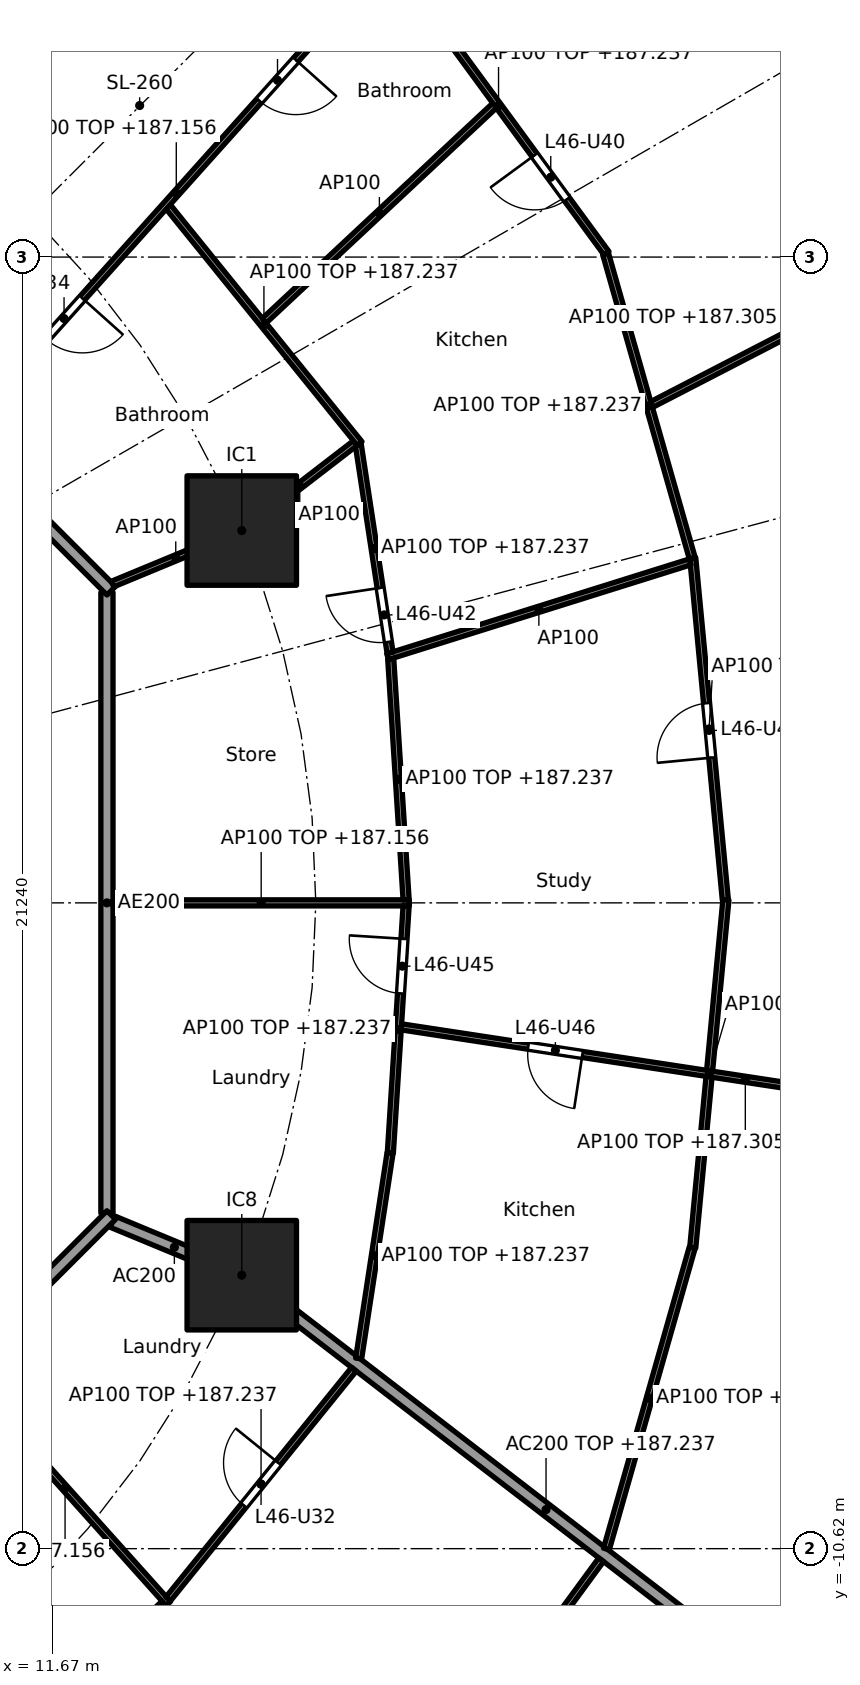
"""IFC4 building model, lengths in metres.
Left out: names, types, materials, properties, quantities, classifications, styles, units other than length and angle.
Written with IfcOpenShell. Run it as: python <this file> out.ifc"""

import sys

from ifc_helpers import new_model, si_unit, direction, frame, frame_2d, origin, origin_2d, place, context, subcontext, project, spatial, rectangle, extrude, element, fill, save


model = new_model("IFC4")
c1 = context("Model", 3, precision=1e-05, world=origin(), true_north=direction((0.0, 1.0)))
c2 = subcontext(c1, "Body", "Model", "MODEL_VIEW")
j1 = project(units=[si_unit("LENGTHUNIT", "METRE"), si_unit("PLANEANGLEUNIT", "RADIAN")], contexts=[c1])
p1 = place(None, origin())
s1 = spatial("IfcSite", under=j1, at=p1, CompositionType="ELEMENT")
p2 = place(p1, origin())
s2 = spatial("IfcBuilding", under=s1, at=p2, CompositionType="ELEMENT")
p3 = place(p2, frame((0.0, 0.0, 184.4)))
s3 = spatial("IfcBuildingStorey", under=s2, at=p3, CompositionType="ELEMENT", Elevation=184.4)
for number, where, z_axis, x_axis in (
    (1, (14.782, 6.123, 0.0), (0.0, 0.0, 1.0), (1.0, 0.0, 0.0)),
    (2, (14.782, -6.123, 0.0), (0.0, 0.0, 1.0), (1.0, 0.0, 0.0)),
):
    element("IfcColumn", number, at=place(p3, frame(where, z_axis=z_axis, x_axis=x_axis)), inside=s3, PredefinedType="COLUMN", context=c2, shape_type="SweptSolid", body=[
        extrude(rectangle(XDim=1.8, YDim=1.8, at=origin_2d()), origin(), (0.0, 0.0, 1.0), 3.7),
    ])
p4 = place(p3, frame((12.657, -5.243, 0.0), z_axis=(0.0, 0.0, 1.0), x_axis=(0.92383017907, -0.382802560388, 0.0)))
e3 = element("IfcWall", 3, at=p4, inside=s3, PredefinedType="PARTITIONING", context=c2, shape_type="SweptSolid", body=[
    extrude(rectangle(XDim=2.2, YDim=0.2, at=frame_2d((1.1, 0.0))), origin(), (0.0, 0.0, 1.0), 3.44),
])
p5 = place(p3, frame((14.822, -6.154, 0.0), z_axis=(0.0, 0.0, 1.0), x_axis=(0.792203056092, -0.610257583254, 0.0)))
e4 = element("IfcWall", 4, at=p5, inside=s3, PredefinedType="PARTITIONING", context=c2, shape_type="SweptSolid", body=[
    extrude(rectangle(XDim=12.533, YDim=0.2, at=frame_2d((6.266, 0.0))), origin(), (0.0, 0.0, 1.0), 2.837),
])
p6 = place(p3, frame((12.565, -5.104, 0.0), z_axis=(0.0, 0.0, 1.0), x_axis=(0.0, 1.0, 0.0)))
e5 = element("IfcWall", 5, at=p6, inside=s3, PredefinedType="PARTITIONING", context=c2, shape_type="SweptSolid", body=[
    extrude(rectangle(XDim=10.209, YDim=0.2, at=frame_2d((5.104, 0.0))), origin(), (0.0, 0.0, 1.0), 3.44),
])
p7 = place(p3, frame((12.635, 5.134, 0.0), z_axis=(0.0, 0.0, 1.0), x_axis=(-0.707106781187, 0.707106781187, 0.0)))
e6 = element("IfcWall", 6, at=p7, inside=s3, PredefinedType="PARTITIONING", context=c2, shape_type="SweptSolid", body=[
    extrude(rectangle(XDim=10.609, YDim=0.2, at=frame_2d((5.305, 0.0))), origin(), (0.0, 0.0, 1.0), 3.44),
])
p8 = place(p7, frame((4.804, 0.0, 0.0)))
e7 = element("IfcOpeningElement", 7, at=p8, cuts=e6, PredefinedType="OPENING", context=c2, shape_type="SweptSolid", body=[
    extrude(rectangle(XDim=1.0, YDim=2.1, at=frame_2d((0.5, 1.05))), frame((0.0, 0.11, 0.0), z_axis=(0.0, -1.0, 0.0), x_axis=(1.0, 0.0, 0.0)), (0.0, 0.0, 1.0), 0.22),
])
p9 = place(p3, frame((5.275, -12.494, 0.0), z_axis=(0.0, 0.0, 1.0), x_axis=(0.707106781187, 0.707106781187, 0.0)))
e8 = element("IfcWall", 8, at=p9, inside=s3, PredefinedType="PARTITIONING", context=c2, shape_type="SweptSolid", body=[
    extrude(rectangle(XDim=10.409, YDim=0.2, at=frame_2d((5.205, 0.0))), origin(), (0.0, 0.0, 1.0), 3.44),
])
p10 = place(p3, frame((12.665, 0.0, 0.0), z_axis=(0.0, 0.0, 1.0), x_axis=(1.0, 0.0, 0.0)))
e9 = element("IfcWall", 9, at=p10, inside=s3, PredefinedType="PARTITIONING", context=c2, shape_type="SweptSolid", body=[
    extrude(rectangle(XDim=4.873, YDim=0.1, at=frame_2d((2.437, 0.0))), origin(), (0.0, 0.0, 1.0), 2.756),
])
p11 = place(p3, frame((17.485, 0.05, 0.0), z_axis=(0.0, 0.0, 1.0), x_axis=(-0.063679314345, 0.99797041285, 0.0)))
e10 = element("IfcWall", 10, at=p11, inside=s3, PredefinedType="PARTITIONING", context=c2, shape_type="SweptSolid", body=[
    extrude(rectangle(XDim=3.972, YDim=0.1, at=frame_2d((1.986, 0.0))), origin(), (0.0, 0.0, 1.0), 2.837),
])
p12 = place(p3, frame((17.485, -0.05, 0.0), z_axis=(0.0, 0.0, 1.0), x_axis=(-0.063673473968, -0.997970785501, 0.0)))
e11 = element("IfcWall", 11, at=p12, inside=s3, PredefinedType="PARTITIONING", context=c2, shape_type="SweptSolid", body=[
    extrude(rectangle(XDim=4.072, YDim=0.1, at=frame_2d((2.036, 0.0))), origin(), (0.0, 0.0, 1.0), 2.837),
])
p13 = place(p12, frame((0.543, 0.0, 0.0)))
e12 = element("IfcOpeningElement", 12, at=p13, cuts=e11, PredefinedType="OPENING", context=c2, shape_type="SweptSolid", body=[
    extrude(rectangle(XDim=0.9, YDim=2.1, at=frame_2d((0.45, 1.05))), frame((0.0, 0.06, 0.0), z_axis=(0.0, -1.0, 0.0), x_axis=(1.0, 0.0, 0.0)), (0.0, 0.0, 1.0), 0.12),
])
p14 = place(p3, frame((22.734, 0.05, 0.0), z_axis=(0.0, 0.0, 1.0), x_axis=(-0.0949274088, 0.995484197292, 0.0)))
e13 = element("IfcWall", 13, at=p14, inside=s3, PredefinedType="PARTITIONING", context=c2, shape_type="SweptSolid", body=[
    extrude(rectangle(XDim=5.648, YDim=0.1, at=frame_2d((2.824, 0.0))), origin(), (0.0, 0.0, 1.0), 2.837),
])
p15 = place(p14, frame((2.349, 0.0, 0.0)))
e14 = element("IfcOpeningElement", 14, at=p15, cuts=e13, PredefinedType="OPENING", context=c2, shape_type="SweptSolid", body=[
    extrude(rectangle(XDim=0.9, YDim=2.1, at=frame_2d((0.45, 1.05))), frame((0.0, 0.06, 0.0), z_axis=(0.0, -1.0, 0.0), x_axis=(1.0, 0.0, 0.0)), (0.0, 0.0, 1.0), 0.12),
])
p16 = place(p3, frame((22.744, 0.05, 0.0), z_axis=(0.0, 0.0, 1.0), x_axis=(-0.094931362305, -0.995483820286, 0.0)))
e15 = element("IfcWall", 15, at=p16, inside=s3, PredefinedType="PARTITIONING", context=c2, shape_type="SweptSolid", body=[
    extrude(rectangle(XDim=5.748, YDim=0.1, at=frame_2d((2.874, 0.0))), origin(), (0.0, 0.0, 1.0), 2.837),
])
p17 = place(p3, frame((17.181, 4.049, 0.0), z_axis=(0.0, 0.0, 1.0), x_axis=(0.954246359918, 0.299021545351, 0.0)))
e16 = element("IfcWall", 16, at=p17, inside=s3, PredefinedType="PARTITIONING", context=c2, shape_type="SweptSolid", body=[
    extrude(rectangle(XDim=5.213, YDim=0.1, at=frame_2d((2.606, 0.0))), origin(), (0.0, 0.0, 1.0), 3.44),
])
p18 = place(p3, frame((17.221, 4.113, 0.0), z_axis=(0.0, 0.0, 1.0), x_axis=(-0.151078880423, 0.988521710379, 0.0)))
e17 = element("IfcWall", 17, at=p18, inside=s3, PredefinedType="PARTITIONING", context=c2, shape_type="SweptSolid", body=[
    extrude(rectangle(XDim=3.469, YDim=0.1, at=frame_2d((1.735, 0.0))), origin(), (0.0, 0.0, 1.0), 2.837),
])
p19 = place(p18, frame((0.18, 0.0, 0.0)))
e18 = element("IfcOpeningElement", 18, at=p19, cuts=e17, PredefinedType="OPENING", context=c2, shape_type="SweptSolid", body=[
    extrude(rectangle(XDim=0.9, YDim=2.1, at=frame_2d((0.45, 1.05))), frame((0.0, 0.06, 0.0), z_axis=(0.0, -1.0, 0.0), x_axis=(1.0, 0.0, 0.0)), (0.0, 0.0, 1.0), 0.12),
])
p20 = place(p3, frame((22.189, 5.67, 0.0), z_axis=(0.0, 0.0, 1.0), x_axis=(-0.273815967041, 0.961782104322, 0.0)))
e19 = element("IfcWall", 19, at=p20, inside=s3, PredefinedType="PARTITIONING", context=c2, shape_type="SweptSolid", body=[
    extrude(rectangle(XDim=5.202, YDim=0.1, at=frame_2d((2.601, 0.0))), origin(), (0.0, 0.0, 1.0), 2.837),
])
p21 = place(p3, frame((21.522, 8.195, 0.0), z_axis=(0.0, 0.0, 1.0), x_axis=(0.888281046031, 0.459300319249, 0.0)))
e20 = element("IfcWall", 20, at=p21, inside=s3, PredefinedType="PARTITIONING", context=c2, shape_type="SweptSolid", body=[
    extrude(rectangle(XDim=6.176, YDim=0.1, at=frame_2d((3.088, 0.0))), origin(), (0.0, 0.0, 1.0), 2.905),
])
p22 = place(p21, frame((2.638, 0.0, 0.0)))
e21 = element("IfcOpeningElement", 21, at=p22, cuts=e20, PredefinedType="OPENING", context=c2, shape_type="SweptSolid", body=[
    extrude(rectangle(XDim=0.9, YDim=2.1, at=frame_2d((0.45, 1.05))), frame((0.0, 0.06, 0.0), z_axis=(0.0, -1.0, 0.0), x_axis=(1.0, 0.0, 0.0)), (0.0, 0.0, 1.0), 0.12),
])
p23 = place(p3, frame((12.657, 5.243, 0.0), z_axis=(0.0, 0.0, 1.0), x_axis=(0.923826362943, 0.382811769845, 0.0)))
e22 = element("IfcWall", 22, at=p23, inside=s3, PredefinedType="PARTITIONING", context=c2, shape_type="SweptSolid", body=[
    extrude(rectangle(XDim=2.25, YDim=0.1, at=frame_2d((1.125, 0.0))), origin(), (0.0, 0.0, 1.0), 3.44),
])
p24 = place(p3, frame((14.822, 6.154, 0.0), z_axis=(0.0, 0.0, 1.0), x_axis=(0.792226528082, 0.610227111987, 0.0)))
e23 = element("IfcWall", 23, at=p24, inside=s3, PredefinedType="PARTITIONING", context=c2, shape_type="SweptSolid", body=[
    extrude(rectangle(XDim=2.307, YDim=0.1, at=frame_2d((1.154, 0.0))), origin(), (0.0, 0.0, 1.0), 3.44),
])
p25 = place(p3, frame((16.721, 7.553, 0.0), z_axis=(0.0, 0.0, 1.0), x_axis=(-0.628753513808, 0.777604667472, 0.0)))
e24 = element("IfcWall", 24, at=p25, inside=s3, PredefinedType="PARTITIONING", context=c2, shape_type="SweptSolid", body=[
    extrude(rectangle(XDim=5.007, YDim=0.1, at=frame_2d((2.504, 0.0))), origin(), (0.0, 0.0, 1.0), 2.837),
])
p26 = place(p3, frame((20.781, 10.681, 0.0), z_axis=(0.0, 0.0, 1.0), x_axis=(-0.591117075283, 0.806585769345, 0.0)))
e25 = element("IfcWall", 25, at=p26, inside=s3, PredefinedType="PARTITIONING", context=c2, shape_type="SweptSolid", body=[
    extrude(rectangle(XDim=6.01, YDim=0.1, at=frame_2d((3.005, 0.0))), origin(), (0.0, 0.0, 1.0), 2.837),
])
p27 = place(p26, frame((1.103, 0.0, 0.0)))
e26 = element("IfcOpeningElement", 26, at=p27, cuts=e25, PredefinedType="OPENING", context=c2, shape_type="SweptSolid", body=[
    extrude(rectangle(XDim=0.9, YDim=2.1, at=frame_2d((0.45, 1.05))), frame((0.0, 0.06, 0.0), z_axis=(0.0, -1.0, 0.0), x_axis=(1.0, 0.0, 0.0)), (0.0, 0.0, 1.0), 0.12),
])
p28 = place(p3, frame((15.152, 9.573, 0.0), z_axis=(0.0, 0.0, 1.0), x_axis=(0.730723083214, 0.682673989294, 0.0)))
e27 = element("IfcWall", 27, at=p28, inside=s3, PredefinedType="PARTITIONING", context=c2, shape_type="SweptSolid", body=[
    extrude(rectangle(XDim=5.183, YDim=0.1, at=frame_2d((2.591, 0.0))), origin(), (0.0, 0.0, 1.0), 3.44),
])
p29 = place(p3, frame((10.178, 7.732, 0.0), z_axis=(0.0, 0.0, 1.0), x_axis=(0.667280084362, 0.744806880348, 0.0)))
e28 = element("IfcWall", 28, at=p29, inside=s3, PredefinedType="PARTITIONING", context=c2, shape_type="SweptSolid", body=[
    extrude(rectangle(XDim=10.572, YDim=0.1, at=frame_2d((5.286, 0.0))), origin(), (0.0, 0.0, 1.0), 2.756),
])
p30 = place(p29, frame((2.07, 0.0, 0.0)))
e29 = element("IfcOpeningElement", 29, at=p30, cuts=e28, PredefinedType="OPENING", context=c2, shape_type="SweptSolid", body=[
    extrude(rectangle(XDim=0.9, YDim=2.1, at=frame_2d((0.45, 1.05))), frame((0.0, 0.06, 0.0), z_axis=(0.0, -1.0, 0.0), x_axis=(1.0, 0.0, 0.0)), (0.0, 0.0, 1.0), 0.12),
])
p31 = place(p29, frame((7.331, 0.0, 0.0)))
e30 = element("IfcOpeningElement", 30, at=p31, cuts=e28, PredefinedType="OPENING", context=c2, shape_type="SweptSolid", body=[
    extrude(rectangle(XDim=0.9, YDim=2.1, at=frame_2d((0.45, 1.05))), frame((0.0, 0.06, 0.0), z_axis=(0.0, -1.0, 0.0), x_axis=(1.0, 0.0, 0.0)), (0.0, 0.0, 1.0), 0.12),
])
p32 = place(p3, frame((7.708, 10.198, 0.0), z_axis=(0.0, 0.0, 1.0), x_axis=(0.501288100085, 0.865280440501, 0.0)))
e31 = element("IfcWall", 31, at=p32, inside=s3, PredefinedType="PARTITIONING", context=c2, shape_type="SweptSolid", body=[
    extrude(rectangle(XDim=10.623, YDim=0.1, at=frame_2d((5.312, 0.0))), origin(), (0.0, 0.0, 1.0), 2.756),
])
p33 = place(p32, frame((2.082, 0.0, 0.0)))
e32 = element("IfcOpeningElement", 32, at=p33, cuts=e31, PredefinedType="OPENING", context=c2, shape_type="SweptSolid", body=[
    extrude(rectangle(XDim=0.9, YDim=2.1, at=frame_2d((0.45, 1.05))), frame((0.0, 0.06, 0.0), z_axis=(0.0, -1.0, 0.0), x_axis=(1.0, 0.0, 0.0)), (0.0, 0.0, 1.0), 0.12),
])
p34 = place(p32, frame((7.369, 0.0, 0.0)))
e33 = element("IfcOpeningElement", 33, at=p34, cuts=e31, PredefinedType="OPENING", context=c2, shape_type="SweptSolid", body=[
    extrude(rectangle(XDim=0.9, YDim=2.1, at=frame_2d((0.45, 1.05))), frame((0.0, 0.06, 0.0), z_axis=(0.0, -1.0, 0.0), x_axis=(1.0, 0.0, 0.0)), (0.0, 0.0, 1.0), 0.12),
])
p35 = place(p3, frame((10.21, -14.614, 0.0), z_axis=(0.0, 0.0, 1.0), x_axis=(0.728883199496, 0.684638066055, 0.0)))
e34 = element("IfcWall", 34, at=p35, inside=s3, PredefinedType="PARTITIONING", context=c2, shape_type="SweptSolid", body=[
    extrude(rectangle(XDim=4.519, YDim=0.1, at=frame_2d((2.26, 0.0))), origin(), (0.0, 0.0, 1.0), 2.837),
])
p36 = place(p35, frame((2.964, 0.0, 0.0)))
e35 = element("IfcOpeningElement", 35, at=p36, cuts=e34, PredefinedType="OPENING", context=c2, shape_type="SweptSolid", body=[
    extrude(rectangle(XDim=0.9, YDim=2.1, at=frame_2d((0.45, 1.05))), frame((0.0, 0.06, 0.0), z_axis=(0.0, -1.0, 0.0), x_axis=(1.0, 0.0, 0.0)), (0.0, 0.0, 1.0), 0.12),
])
p37 = place(p3, frame((10.178, -7.732, 0.0), z_axis=(0.0, 0.0, 1.0), x_axis=(0.667285466359, -0.744802058527, 0.0)))
e36 = element("IfcWall", 36, at=p37, inside=s3, PredefinedType="PARTITIONING", context=c2, shape_type="SweptSolid", body=[
    extrude(rectangle(XDim=5.09, YDim=0.1, at=frame_2d((2.545, 0.0))), origin(), (0.0, 0.0, 1.0), 2.756),
])
p38 = place(p3, frame((13.572, -11.447, 0.0), z_axis=(0.0, 0.0, 1.0), x_axis=(0.628738316533, 0.777616955399, 0.0)))
e37 = element("IfcWall", 37, at=p38, inside=s3, PredefinedType="PARTITIONING", context=c2, shape_type="SweptSolid", body=[
    extrude(rectangle(XDim=4.857, YDim=0.1, at=frame_2d((2.429, 0.0))), origin(), (0.0, 0.0, 1.0), 2.837),
])
p39 = place(p38, frame((1.979, 0.0, 0.0)))
e38 = element("IfcOpeningElement", 38, at=p39, cuts=e37, PredefinedType="OPENING", context=c2, shape_type="SweptSolid", body=[
    extrude(rectangle(XDim=0.9, YDim=2.1, at=frame_2d((0.45, 1.05))), frame((0.0, 0.06, 0.0), z_axis=(0.0, -1.0, 0.0), x_axis=(1.0, 0.0, 0.0)), (0.0, 0.0, 1.0), 0.12),
])
p40 = place(p3, frame((17.229, -15.529, 0.0), z_axis=(0.0, 0.0, 1.0), x_axis=(0.591110768293, 0.806590391468, 0.0)))
e39 = element("IfcWall", 39, at=p40, inside=s3, PredefinedType="PARTITIONING", context=c2, shape_type="SweptSolid", body=[
    extrude(rectangle(XDim=5.86, YDim=0.1, at=frame_2d((2.93, 0.0))), origin(), (0.0, 0.0, 1.0), 2.837),
])
p41 = place(p3, frame((16.704, -7.493, 0.0), z_axis=(0.0, 0.0, 1.0), x_axis=(0.1510806336, 0.988521442434, 0.0)))
e40 = element("IfcWall", 40, at=p41, inside=s3, PredefinedType="PARTITIONING", context=c2, shape_type="SweptSolid", body=[
    extrude(rectangle(XDim=3.419, YDim=0.1, at=frame_2d((1.71, 0.0))), origin(), (0.0, 0.0, 1.0), 2.837),
])
p42 = place(p3, frame((20.779, -10.625, 0.0), z_axis=(0.0, 0.0, 1.0), x_axis=(0.273819702124, 0.961781040949, 0.0)))
e41 = element("IfcWall", 41, at=p42, inside=s3, PredefinedType="PARTITIONING", context=c2, shape_type="SweptSolid", body=[
    extrude(rectangle(XDim=5.152, YDim=0.1, at=frame_2d((2.576, 0.0))), origin(), (0.0, 0.0, 1.0), 2.837),
])
p43 = place(p3, frame((17.407, -2.039, 0.0), z_axis=(0.0, 0.0, 1.0), x_axis=(0.98858728603, -0.150649188184, 0.0)))
e42 = element("IfcWall", 42, at=p43, inside=s3, PredefinedType="PARTITIONING", context=c2, shape_type="SweptSolid", body=[
    extrude(rectangle(XDim=11.441, YDim=0.1, at=frame_2d((5.721, 0.0))), origin(), (0.0, 0.0, 1.0), 2.905),
])
p44 = place(p43, frame((7.832, 0.0, 0.0)))
e43 = element("IfcOpeningElement", 43, at=p44, cuts=e42, PredefinedType="OPENING", context=c2, shape_type="SweptSolid", body=[
    extrude(rectangle(XDim=0.9, YDim=2.1, at=frame_2d((0.45, 1.05))), frame((0.0, 0.06, 0.0), z_axis=(0.0, -1.0, 0.0), x_axis=(1.0, 0.0, 0.0)), (0.0, 0.0, 1.0), 0.12),
])
p45 = place(p43, frame((2.111, 0.0, 0.0)))
e44 = element("IfcOpeningElement", 44, at=p45, cuts=e42, PredefinedType="OPENING", context=c2, shape_type="SweptSolid", body=[
    extrude(rectangle(XDim=0.9, YDim=2.1, at=frame_2d((0.45, 1.05))), frame((0.0, 0.06, 0.0), z_axis=(0.0, -1.0, 0.0), x_axis=(1.0, 0.0, 0.0)), (0.0, 0.0, 1.0), 0.12),
])
p46 = place(p39, origin())
e45 = element("IfcDoor", 45, at=p46, inside=s3, OperationType="SINGLE_SWING_RIGHT", PredefinedType="DOOR", context=c2, shape_type="SweptSolid", body=[
    extrude(rectangle(XDim=0.9, YDim=2.1, at=frame_2d((0.45, 1.05))), frame((0.0, 0.025, 0.0), z_axis=(0.0, -1.0, 0.0), x_axis=(1.0, 0.0, 0.0)), (0.0, 0.0, 1.0), 0.05),
])
fill(e38, e45)
p47 = place(p30, frame((0.9, 0.0, 0.0), x_axis=(-1.0, 0.0, 0.0)))
e46 = element("IfcDoor", 46, at=p47, inside=s3, OperationType="SINGLE_SWING_LEFT", PredefinedType="DOOR", context=c2, shape_type="SweptSolid", body=[
    extrude(rectangle(XDim=0.9, YDim=2.1, at=frame_2d((0.45, 1.05))), frame((0.0, 0.025, 0.0), z_axis=(0.0, -1.0, 0.0), x_axis=(1.0, 0.0, 0.0)), (0.0, 0.0, 1.0), 0.05),
])
fill(e29, e46)
p48 = place(p31, frame((0.9, 0.0, 0.0), x_axis=(-1.0, 0.0, 0.0)))
e47 = element("IfcDoor", 47, at=p48, inside=s3, OperationType="SINGLE_SWING_LEFT", PredefinedType="DOOR", context=c2, shape_type="SweptSolid", body=[
    extrude(rectangle(XDim=0.9, YDim=2.1, at=frame_2d((0.45, 1.05))), frame((0.0, 0.025, 0.0), z_axis=(0.0, -1.0, 0.0), x_axis=(1.0, 0.0, 0.0)), (0.0, 0.0, 1.0), 0.05),
])
fill(e30, e47)
p49 = place(p27, origin())
e48 = element("IfcDoor", 48, at=p49, inside=s3, OperationType="SINGLE_SWING_RIGHT", PredefinedType="DOOR", context=c2, shape_type="SweptSolid", body=[
    extrude(rectangle(XDim=0.9, YDim=2.1, at=frame_2d((0.45, 1.05))), frame((0.0, 0.025, 0.0), z_axis=(0.0, -1.0, 0.0), x_axis=(1.0, 0.0, 0.0)), (0.0, 0.0, 1.0), 0.05),
])
fill(e26, e48)
p50 = place(p19, origin())
e49 = element("IfcDoor", 49, at=p50, inside=s3, OperationType="SINGLE_SWING_RIGHT", PredefinedType="DOOR", context=c2, shape_type="SweptSolid", body=[
    extrude(rectangle(XDim=0.9, YDim=2.1, at=frame_2d((0.45, 1.05))), frame((0.0, 0.025, 0.0), z_axis=(0.0, -1.0, 0.0), x_axis=(1.0, 0.0, 0.0)), (0.0, 0.0, 1.0), 0.05),
])
fill(e18, e49)
p51 = place(p15, origin())
e50 = element("IfcDoor", 50, at=p51, inside=s3, OperationType="SINGLE_SWING_LEFT", PredefinedType="DOOR", context=c2, shape_type="SweptSolid", body=[
    extrude(rectangle(XDim=0.9, YDim=2.1, at=frame_2d((0.45, 1.05))), frame((0.0, 0.025, 0.0), z_axis=(0.0, -1.0, 0.0), x_axis=(1.0, 0.0, 0.0)), (0.0, 0.0, 1.0), 0.05),
])
fill(e14, e50)
p52 = place(p13, frame((0.9, 0.0, 0.0), x_axis=(-1.0, 0.0, 0.0)))
e51 = element("IfcDoor", 51, at=p52, inside=s3, OperationType="SINGLE_SWING_RIGHT", PredefinedType="DOOR", context=c2, shape_type="SweptSolid", body=[
    extrude(rectangle(XDim=0.9, YDim=2.1, at=frame_2d((0.45, 1.05))), frame((0.0, 0.025, 0.0), z_axis=(0.0, -1.0, 0.0), x_axis=(1.0, 0.0, 0.0)), (0.0, 0.0, 1.0), 0.05),
])
fill(e12, e51)
p53 = place(p45, frame((0.9, 0.0, 0.0), x_axis=(-1.0, 0.0, 0.0)))
e52 = element("IfcDoor", 52, at=p53, inside=s3, OperationType="SINGLE_SWING_LEFT", PredefinedType="DOOR", context=c2, shape_type="SweptSolid", body=[
    extrude(rectangle(XDim=0.9, YDim=2.1, at=frame_2d((0.45, 1.05))), frame((0.0, 0.025, 0.0), z_axis=(0.0, -1.0, 0.0), x_axis=(1.0, 0.0, 0.0)), (0.0, 0.0, 1.0), 0.05),
])
fill(e44, e52)
save(model, sys.argv[1])
